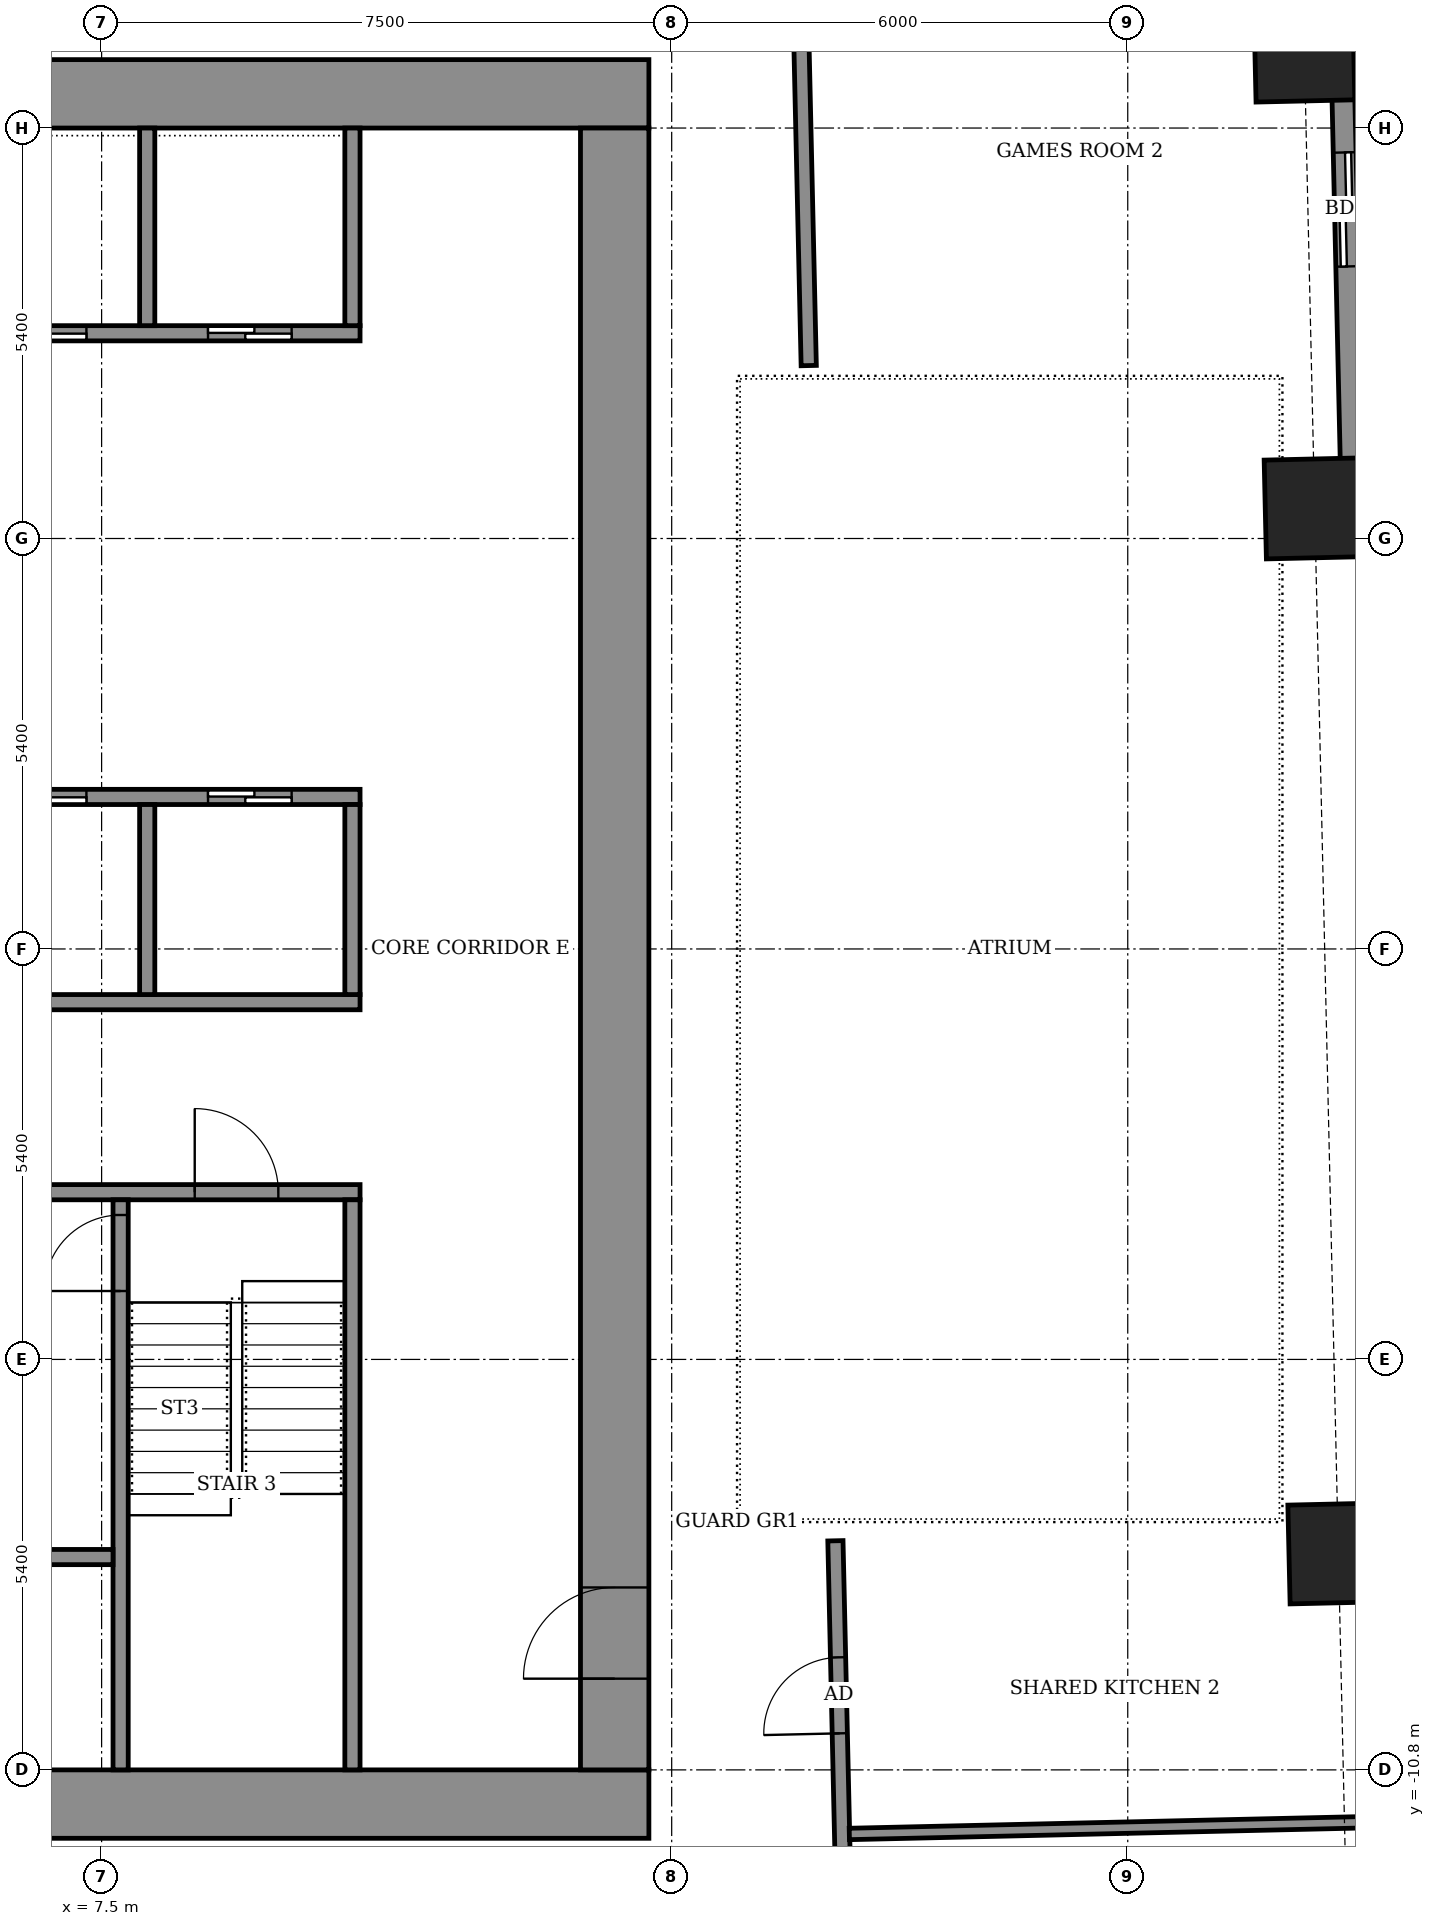
"""IFC4 building model, lengths in metres.
Left out: names, types, materials, properties, quantities, classifications, styles, units other than length and angle.
Written with IfcOpenShell. Run it as: python <this file> out.ifc"""

import sys

from ifc_helpers import new_model, si_unit, direction, frame, frame_2d, origin, origin_2d, place, context, subcontext, project, spatial, rectangle, extrude, element, fill, save


model = new_model("IFC4")
c1 = context("Model", 3, precision=1e-05, world=origin(), true_north=direction((0.0, 1.0)))
c2 = subcontext(c1, "Body", "Model", "MODEL_VIEW")
j1 = project(units=[si_unit("LENGTHUNIT", "METRE"), si_unit("PLANEANGLEUNIT", "RADIAN")], contexts=[c1])
p1 = place(None, origin())
s1 = spatial("IfcSite", under=j1, at=p1, CompositionType="ELEMENT")
p2 = place(p1, origin())
s2 = spatial("IfcBuilding", under=s1, at=p2, CompositionType="ELEMENT")
p3 = place(p2, frame((0.0, 0.0, 140.9)))
s3 = spatial("IfcBuildingStorey", under=s2, at=p3, CompositionType="ELEMENT", Elevation=140.9)
for number, where, z_axis, x_axis in (
    (1, (23.771, -7.952, -0.55), (0.0, 0.0, 1.0), (-0.023, 1.0, 0.0)),
    (2, (23.459, 5.796, -0.55), (0.0, 0.0, 1.0), (-0.023, 1.0, 0.0)),
    (3, (23.323, 11.806, -0.55), (0.0, 0.0, 1.0), (-0.023, 1.0, 0.0)),
):
    element("IfcColumn", number, at=place(p3, frame(where, z_axis=z_axis, x_axis=x_axis)), inside=s3, PredefinedType="COLUMN", context=c2, shape_type="SweptSolid", body=[
        extrude(rectangle(XDim=1.3, YDim=1.3, at=origin_2d()), origin(), (0.0, 0.0, 1.0), 3.6),
    ])
p4 = place(p3, frame((23.961, 5.752, 0.0), z_axis=(0.0, 0.0, 1.0), x_axis=(-0.022715362207, 0.999741972871, 0.0)))
e4 = element("IfcWall", 4, at=p4, inside=s3, PredefinedType="SOLIDWALL", context=c2, shape_type="SweptSolid", body=[
    extrude(rectangle(XDim=11.93, YDim=0.3, at=frame_2d((5.965, 0.0))), origin(), (0.0, 0.0, 1.0), 3.05),
])
p5 = place(p4, frame((3.228, 0.0, 0.0)))
e5 = element("IfcOpeningElement", 5, at=p5, cuts=e4, PredefinedType="OPENING", context=c2, shape_type="SweptSolid", body=[
    extrude(rectangle(XDim=1.5, YDim=2.4, at=frame_2d((0.75, 1.2))), frame((0.0, 0.16, 0.0), z_axis=(0.0, -1.0, 0.0), x_axis=(1.0, 0.0, 0.0)), (0.0, 0.0, 1.0), 0.32),
])
p6 = place(p4, frame((7.629, 0.0, 0.9)))
e6 = element("IfcOpeningElement", 6, at=p6, cuts=e4, PredefinedType="OPENING", context=c2, shape_type="SweptSolid", body=[
    extrude(rectangle(XDim=0.9, YDim=1.5, at=frame_2d((0.45, 0.75))), frame((0.0, 0.16, 0.0), z_axis=(0.0, -1.0, 0.0), x_axis=(1.0, 0.0, 0.0)), (0.0, 0.0, 1.0), 0.32),
])
p7 = place(p4, frame((9.316, 0.0, 0.9)))
e7 = element("IfcOpeningElement", 7, at=p7, cuts=e4, PredefinedType="OPENING", context=c2, shape_type="SweptSolid", body=[
    extrude(rectangle(XDim=1.2, YDim=1.5, at=frame_2d((0.6, 0.75))), frame((0.0, 0.16, 0.0), z_axis=(0.0, -1.0, 0.0), x_axis=(1.0, 0.0, 0.0)), (0.0, 0.0, 1.0), 0.32),
])
p8 = place(p3, frame((17.328, -15.448, 0.0), z_axis=(0.0, 0.0, 1.0), x_axis=(-0.022680883318, 0.999742755679, 0.0)))
e8 = element("IfcWall", 8, at=p8, inside=s3, PredefinedType="PARTITIONING", context=c2, shape_type="SweptSolid", body=[
    extrude(rectangle(XDim=7.664, YDim=0.2, at=frame_2d((3.832, 0.0))), origin(), (0.0, 0.0, 1.0), 3.05),
])
p9 = place(p8, frame((5.13, 0.0, 0.0)))
e9 = element("IfcOpeningElement", 9, at=p9, cuts=e8, PredefinedType="OPENING", context=c2, shape_type="SweptSolid", body=[
    extrude(rectangle(XDim=1.0, YDim=2.1, at=frame_2d((0.5, 1.05))), frame((0.0, 0.11, 0.0), z_axis=(0.0, -1.0, 0.0), x_axis=(1.0, 0.0, 0.0)), (0.0, 0.0, 1.0), 0.22),
])
p10 = place(p3, frame((17.337, -11.643, 0.0), z_axis=(0.0, 0.0, 1.0), x_axis=(0.999741061159, 0.022755452803, 0.0)))
e10 = element("IfcWall", 10, at=p10, inside=s3, PredefinedType="PARTITIONING", context=c2, shape_type="SweptSolid", body=[
    extrude(rectangle(XDim=7.167, YDim=0.15, at=frame_2d((3.583, 0.0))), origin(), (0.0, 0.0, 1.0), 2.55),
])
p11 = place(p3, frame((16.803, 7.675, 0.0), z_axis=(0.0, 0.0, 1.0), x_axis=(-0.022667483124, 0.999743059595, 0.0)))
e11 = element("IfcWall", 11, at=p11, inside=s3, PredefinedType="PARTITIONING", context=c2, shape_type="SweptSolid", body=[
    extrude(rectangle(XDim=5.245, YDim=0.2, at=frame_2d((2.623, 0.0))), origin(), (0.0, 0.0, 1.0), 3.05),
])
for number, where, z_axis, x_axis in (
    (12, (-14.7, -11.25, 0.0), (0.0, 0.0, 1.0), (1.0, 0.0, 0.0)),
    (13, (-14.7, 11.25, 0.0), (0.0, 0.0, 1.0), (1.0, 0.0, 0.0)),
):
    element("IfcWall", number, at=place(p3, frame(where, z_axis=z_axis, x_axis=x_axis)), inside=s3, PredefinedType="SHEAR", context=c2, shape_type="SweptSolid", body=[
        extrude(rectangle(XDim=29.4, YDim=0.9, at=frame_2d((14.7, 0.0))), origin(), (0.0, 0.0, 1.0), 3.6),
    ])
p12 = place(p3, frame((14.25, -10.8, 0.0), z_axis=(0.0, 0.0, 1.0), x_axis=(0.0, 1.0, 0.0)))
e14 = element("IfcWall", 14, at=p12, inside=s3, PredefinedType="SHEAR", context=c2, shape_type="SweptSolid", body=[
    extrude(rectangle(XDim=21.6, YDim=0.9, at=frame_2d((10.8, 0.0))), origin(), (0.0, 0.0, 1.0), 3.6),
])
p13 = place(p12, frame((1.2, 0.0, 0.0)))
e15 = element("IfcOpeningElement", 15, at=p13, cuts=e14, PredefinedType="OPENING", context=c2, shape_type="SweptSolid", body=[
    extrude(rectangle(XDim=1.2, YDim=2.1, at=frame_2d((0.6, 1.05))), frame((0.0, 0.46, 0.0), z_axis=(0.0, -1.0, 0.0), x_axis=(1.0, 0.0, 0.0)), (0.0, 0.0, 1.0), 0.92),
])
p14 = place(p3, frame((-10.9, -3.2, 0.0), z_axis=(0.0, 0.0, 1.0), x_axis=(1.0, 0.0, 0.0)))
e16 = element("IfcWall", 16, at=p14, inside=s3, PredefinedType="SHEAR", context=c2, shape_type="SweptSolid", body=[
    extrude(rectangle(XDim=21.8, YDim=0.2, at=frame_2d((10.9, 0.0))), origin(), (0.0, 0.0, 1.0), 3.05),
])
p15 = place(p14, frame((1.075, 0.0, 0.0)))
e17 = element("IfcOpeningElement", 17, at=p15, cuts=e16, PredefinedType="OPENING", context=c2, shape_type="SweptSolid", body=[
    extrude(rectangle(XDim=1.1, YDim=2.1, at=frame_2d((0.55, 1.05))), frame((0.0, 0.11, 0.0), z_axis=(0.0, -1.0, 0.0), x_axis=(1.0, 0.0, 0.0)), (0.0, 0.0, 1.0), 0.22),
])
p16 = place(p14, frame((10.325, 0.0, 0.0)))
e18 = element("IfcOpeningElement", 18, at=p16, cuts=e16, PredefinedType="OPENING", context=c2, shape_type="SweptSolid", body=[
    extrude(rectangle(XDim=1.1, YDim=2.1, at=frame_2d((0.55, 1.05))), frame((0.0, 0.11, 0.0), z_axis=(0.0, -1.0, 0.0), x_axis=(1.0, 0.0, 0.0)), (0.0, 0.0, 1.0), 0.22),
])
p17 = place(p14, frame((19.625, 0.0, 0.0)))
e19 = element("IfcOpeningElement", 19, at=p17, cuts=e16, PredefinedType="OPENING", context=c2, shape_type="SweptSolid", body=[
    extrude(rectangle(XDim=1.1, YDim=2.1, at=frame_2d((0.55, 1.05))), frame((0.0, 0.11, 0.0), z_axis=(0.0, -1.0, 0.0), x_axis=(1.0, 0.0, 0.0)), (0.0, 0.0, 1.0), 0.22),
])
p18 = place(p14, frame((5.7, 0.0, 0.0)))
e20 = element("IfcOpeningElement", 20, at=p18, cuts=e16, PredefinedType="OPENING", context=c2, shape_type="SweptSolid", body=[
    extrude(rectangle(XDim=1.1, YDim=2.1, at=frame_2d((0.55, 1.05))), frame((0.0, 0.11, 0.0), z_axis=(0.0, -1.0, 0.0), x_axis=(1.0, 0.0, 0.0)), (0.0, 0.0, 1.0), 0.22),
])
p19 = place(p14, frame((14.975, 0.0, 0.0)))
e21 = element("IfcOpeningElement", 21, at=p19, cuts=e16, PredefinedType="OPENING", context=c2, shape_type="SweptSolid", body=[
    extrude(rectangle(XDim=1.1, YDim=2.1, at=frame_2d((0.55, 1.05))), frame((0.0, 0.11, 0.0), z_axis=(0.0, -1.0, 0.0), x_axis=(1.0, 0.0, 0.0)), (0.0, 0.0, 1.0), 0.22),
])
p20 = place(p3, frame((-10.9, -0.7, 0.0), z_axis=(0.0, 0.0, 1.0), x_axis=(1.0, 0.0, 0.0)))
e22 = element("IfcWall", 22, at=p20, inside=s3, PredefinedType="SHEAR", context=c2, shape_type="SweptSolid", body=[
    extrude(rectangle(XDim=21.8, YDim=0.2, at=frame_2d((10.9, 0.0))), origin(), (0.0, 0.0, 1.0), 3.05),
])
p21 = place(p3, frame((-10.9, 2.0, 0.0), z_axis=(0.0, 0.0, 1.0), x_axis=(1.0, 0.0, 0.0)))
e23 = element("IfcWall", 23, at=p21, inside=s3, PredefinedType="SHEAR", context=c2, shape_type="SweptSolid", body=[
    extrude(rectangle(XDim=21.8, YDim=0.2, at=frame_2d((10.9, 0.0))), origin(), (0.0, 0.0, 1.0), 3.05),
])
p22 = place(p21, frame((14.4, 0.0, 0.0)))
e24 = element("IfcOpeningElement", 24, at=p22, cuts=e23, PredefinedType="OPENING", context=c2, shape_type="SweptSolid", body=[
    extrude(rectangle(XDim=1.1, YDim=2.1, at=frame_2d((0.55, 1.05))), frame((0.0, 0.11, 0.0), z_axis=(0.0, -1.0, 0.0), x_axis=(1.0, 0.0, 0.0)), (0.0, 0.0, 1.0), 0.22),
])
p23 = place(p21, frame((17.1, 0.0, 0.0)))
e25 = element("IfcOpeningElement", 25, at=p23, cuts=e23, PredefinedType="OPENING", context=c2, shape_type="SweptSolid", body=[
    extrude(rectangle(XDim=1.1, YDim=2.1, at=frame_2d((0.55, 1.05))), frame((0.0, 0.11, 0.0), z_axis=(0.0, -1.0, 0.0), x_axis=(1.0, 0.0, 0.0)), (0.0, 0.0, 1.0), 0.22),
])
p24 = place(p21, frame((19.8, 0.0, 0.0)))
e26 = element("IfcOpeningElement", 26, at=p24, cuts=e23, PredefinedType="OPENING", context=c2, shape_type="SweptSolid", body=[
    extrude(rectangle(XDim=1.1, YDim=2.1, at=frame_2d((0.55, 1.05))), frame((0.0, 0.11, 0.0), z_axis=(0.0, -1.0, 0.0), x_axis=(1.0, 0.0, 0.0)), (0.0, 0.0, 1.0), 0.22),
])
p25 = place(p21, frame((1.675, 0.0, 0.0)))
e27 = element("IfcOpeningElement", 27, at=p25, cuts=e23, PredefinedType="OPENING", context=c2, shape_type="SweptSolid", body=[
    extrude(rectangle(XDim=0.9, YDim=2.1, at=frame_2d((0.45, 1.05))), frame((0.0, 0.11, 0.0), z_axis=(0.0, -1.0, 0.0), x_axis=(1.0, 0.0, 0.0)), (0.0, 0.0, 1.0), 0.22),
])
p26 = place(p21, frame((8.425, 0.0, 0.0)))
e28 = element("IfcOpeningElement", 28, at=p26, cuts=e23, PredefinedType="OPENING", context=c2, shape_type="SweptSolid", body=[
    extrude(rectangle(XDim=0.9, YDim=2.1, at=frame_2d((0.45, 1.05))), frame((0.0, 0.11, 0.0), z_axis=(0.0, -1.0, 0.0), x_axis=(1.0, 0.0, 0.0)), (0.0, 0.0, 1.0), 0.22),
])
p27 = place(p3, frame((-10.9, 8.1, 0.0), z_axis=(0.0, 0.0, 1.0), x_axis=(1.0, 0.0, 0.0)))
e29 = element("IfcWall", 29, at=p27, inside=s3, PredefinedType="SHEAR", context=c2, shape_type="SweptSolid", body=[
    extrude(rectangle(XDim=21.8, YDim=0.2, at=frame_2d((10.9, 0.0))), origin(), (0.0, 0.0, 1.0), 3.05),
])
p28 = place(p27, frame((14.4, 0.0, 0.0)))
e30 = element("IfcOpeningElement", 30, at=p28, cuts=e29, PredefinedType="OPENING", context=c2, shape_type="SweptSolid", body=[
    extrude(rectangle(XDim=1.1, YDim=2.1, at=frame_2d((0.55, 1.05))), frame((0.0, 0.11, 0.0), z_axis=(0.0, -1.0, 0.0), x_axis=(1.0, 0.0, 0.0)), (0.0, 0.0, 1.0), 0.22),
])
p29 = place(p27, frame((17.1, 0.0, 0.0)))
e31 = element("IfcOpeningElement", 31, at=p29, cuts=e29, PredefinedType="OPENING", context=c2, shape_type="SweptSolid", body=[
    extrude(rectangle(XDim=1.1, YDim=2.1, at=frame_2d((0.55, 1.05))), frame((0.0, 0.11, 0.0), z_axis=(0.0, -1.0, 0.0), x_axis=(1.0, 0.0, 0.0)), (0.0, 0.0, 1.0), 0.22),
])
p30 = place(p27, frame((19.8, 0.0, 0.0)))
e32 = element("IfcOpeningElement", 32, at=p30, cuts=e29, PredefinedType="OPENING", context=c2, shape_type="SweptSolid", body=[
    extrude(rectangle(XDim=1.1, YDim=2.1, at=frame_2d((0.55, 1.05))), frame((0.0, 0.11, 0.0), z_axis=(0.0, -1.0, 0.0), x_axis=(1.0, 0.0, 0.0)), (0.0, 0.0, 1.0), 0.22),
])
p31 = place(p27, frame((1.675, 0.0, 0.0)))
e33 = element("IfcOpeningElement", 33, at=p31, cuts=e29, PredefinedType="OPENING", context=c2, shape_type="SweptSolid", body=[
    extrude(rectangle(XDim=0.9, YDim=2.1, at=frame_2d((0.45, 1.05))), frame((0.0, 0.11, 0.0), z_axis=(0.0, -1.0, 0.0), x_axis=(1.0, 0.0, 0.0)), (0.0, 0.0, 1.0), 0.22),
])
p32 = place(p27, frame((8.425, 0.0, 0.0)))
e34 = element("IfcOpeningElement", 34, at=p32, cuts=e29, PredefinedType="OPENING", context=c2, shape_type="SweptSolid", body=[
    extrude(rectangle(XDim=0.9, YDim=2.1, at=frame_2d((0.45, 1.05))), frame((0.0, 0.11, 0.0), z_axis=(0.0, -1.0, 0.0), x_axis=(1.0, 0.0, 0.0)), (0.0, 0.0, 1.0), 0.22),
])
p33 = place(p3, frame((7.75, -10.8, 0.0), z_axis=(0.0, 0.0, 1.0), x_axis=(0.0, 1.0, 0.0)))
e35 = element("IfcWall", 35, at=p33, inside=s3, PredefinedType="SHEAR", context=c2, shape_type="SweptSolid", body=[
    extrude(rectangle(XDim=7.5, YDim=0.2, at=frame_2d((3.75, 0.0))), origin(), (0.0, 0.0, 1.0), 3.05),
])
p34 = place(p33, frame((6.3, 0.0, 0.0)))
e36 = element("IfcOpeningElement", 36, at=p34, cuts=e35, PredefinedType="OPENING", context=c2, shape_type="SweptSolid", body=[
    extrude(rectangle(XDim=1.0, YDim=2.1, at=frame_2d((0.5, 1.05))), frame((0.0, 0.11, 0.0), z_axis=(0.0, -1.0, 0.0), x_axis=(1.0, 0.0, 0.0)), (0.0, 0.0, 1.0), 0.22),
])
p35 = place(p3, frame((10.8, -10.8, 0.0), z_axis=(0.0, 0.0, 1.0), x_axis=(0.0, 1.0, 0.0)))
e37 = element("IfcWall", 37, at=p35, inside=s3, PredefinedType="SHEAR", context=c2, shape_type="SweptSolid", body=[
    extrude(rectangle(XDim=7.5, YDim=0.2, at=frame_2d((3.75, 0.0))), origin(), (0.0, 0.0, 1.0), 3.05),
])
p36 = place(p3, frame((1.6, -8.0, 0.0), z_axis=(0.0, 0.0, 1.0), x_axis=(1.0, 0.0, 0.0)))
e38 = element("IfcWall", 38, at=p36, inside=s3, PredefinedType="SHEAR", context=c2, shape_type="SweptSolid", body=[
    extrude(rectangle(XDim=6.05, YDim=0.2, at=frame_2d((3.025, 0.0))), origin(), (0.0, 0.0, 1.0), 3.05),
])
p37 = place(p36, frame((0.913, 0.0, 0.0)))
e39 = element("IfcOpeningElement", 39, at=p37, cuts=e38, PredefinedType="OPENING", context=c2, shape_type="SweptSolid", body=[
    extrude(rectangle(XDim=1.1, YDim=2.1, at=frame_2d((0.55, 1.05))), frame((0.0, 0.11, 0.0), z_axis=(0.0, -1.0, 0.0), x_axis=(1.0, 0.0, 0.0)), (0.0, 0.0, 1.0), 0.22),
])
p38 = place(p36, frame((4.038, 0.0, 0.0)))
e40 = element("IfcOpeningElement", 40, at=p38, cuts=e38, PredefinedType="OPENING", context=c2, shape_type="SweptSolid", body=[
    extrude(rectangle(XDim=1.1, YDim=2.1, at=frame_2d((0.55, 1.05))), frame((0.0, 0.11, 0.0), z_axis=(0.0, -1.0, 0.0), x_axis=(1.0, 0.0, 0.0)), (0.0, 0.0, 1.0), 0.22),
])
for number, where, z_axis, x_axis in (
    (41, (8.1, -0.6, 0.0), (0.0, 0.0, 1.0), (0.0, 1.0, 0.0)),
    (42, (10.8, -0.6, 0.0), (0.0, 0.0, 1.0), (0.0, 1.0, 0.0)),
):
    element("IfcWall", number, at=place(p3, frame(where, z_axis=z_axis, x_axis=x_axis)), inside=s3, PredefinedType="SHEAR", context=c2, shape_type="SweptSolid", body=[
        extrude(rectangle(XDim=2.5, YDim=0.2, at=frame_2d((1.25, 0.0))), origin(), (0.0, 0.0, 1.0), 3.05),
    ])
for number, where, z_axis, x_axis in (
    (43, (8.1, 8.2, 0.0), (0.0, 0.0, 1.0), (0.0, 1.0, 0.0)),
    (44, (10.8, 8.2, 0.0), (0.0, 0.0, 1.0), (0.0, 1.0, 0.0)),
):
    element("IfcWall", number, at=place(p3, frame(where, z_axis=z_axis, x_axis=x_axis)), inside=s3, PredefinedType="SHEAR", context=c2, shape_type="SweptSolid", body=[
        extrude(rectangle(XDim=2.6, YDim=0.2, at=frame_2d((1.3, 0.0))), origin(), (0.0, 0.0, 1.0), 3.05),
    ])
p39 = place(p5, origin())
e45 = element("IfcDoor", 45, at=p39, inside=s3, OperationType="SLIDING_TO_LEFT", PredefinedType="DOOR", context=c2, shape_type="SweptSolid", body=[
    extrude(rectangle(XDim=1.5, YDim=2.4, at=frame_2d((0.75, 1.2))), frame((0.0, 0.025, 0.0), z_axis=(0.0, -1.0, 0.0), x_axis=(1.0, 0.0, 0.0)), (0.0, 0.0, 1.0), 0.05),
])
fill(e5, e45)
p40 = place(p9, origin())
e46 = element("IfcDoor", 46, at=p40, inside=s3, OperationType="SINGLE_SWING_RIGHT", PredefinedType="DOOR", context=c2, shape_type="SweptSolid", body=[
    extrude(rectangle(XDim=1.0, YDim=2.1, at=frame_2d((0.5, 1.05))), frame((0.0, 0.025, 0.0), z_axis=(0.0, -1.0, 0.0), x_axis=(1.0, 0.0, 0.0)), (0.0, 0.0, 1.0), 0.05),
])
fill(e9, e46)
p41 = place(p13, origin())
e47 = element("IfcDoor", 47, at=p41, inside=s3, OperationType="DOUBLE_DOOR_SINGLE_SWING", PredefinedType="DOOR", context=c2, shape_type="SweptSolid", body=[
    extrude(rectangle(XDim=1.2, YDim=2.1, at=frame_2d((0.6, 1.05))), frame((0.0, 0.025, 0.0), z_axis=(0.0, -1.0, 0.0), x_axis=(1.0, 0.0, 0.0)), (0.0, 0.0, 1.0), 0.05),
])
fill(e15, e47)
p42 = place(p23, origin())
e48 = element("IfcDoor", 48, at=p42, inside=s3, OperationType="SLIDING_TO_LEFT", PredefinedType="DOOR", context=c2, shape_type="SweptSolid", body=[
    extrude(rectangle(XDim=1.1, YDim=2.1, at=frame_2d((0.55, 1.05))), frame((0.0, 0.025, 0.0), z_axis=(0.0, -1.0, 0.0), x_axis=(1.0, 0.0, 0.0)), (0.0, 0.0, 1.0), 0.05),
])
fill(e25, e48)
p43 = place(p24, origin())
e49 = element("IfcDoor", 49, at=p43, inside=s3, OperationType="SLIDING_TO_LEFT", PredefinedType="DOOR", context=c2, shape_type="SweptSolid", body=[
    extrude(rectangle(XDim=1.1, YDim=2.1, at=frame_2d((0.55, 1.05))), frame((0.0, 0.025, 0.0), z_axis=(0.0, -1.0, 0.0), x_axis=(1.0, 0.0, 0.0)), (0.0, 0.0, 1.0), 0.05),
])
fill(e26, e49)
p44 = place(p29, origin())
e50 = element("IfcDoor", 50, at=p44, inside=s3, OperationType="SLIDING_TO_LEFT", PredefinedType="DOOR", context=c2, shape_type="SweptSolid", body=[
    extrude(rectangle(XDim=1.1, YDim=2.1, at=frame_2d((0.55, 1.05))), frame((0.0, 0.025, 0.0), z_axis=(0.0, -1.0, 0.0), x_axis=(1.0, 0.0, 0.0)), (0.0, 0.0, 1.0), 0.05),
])
fill(e31, e50)
p45 = place(p30, origin())
e51 = element("IfcDoor", 51, at=p45, inside=s3, OperationType="SLIDING_TO_LEFT", PredefinedType="DOOR", context=c2, shape_type="SweptSolid", body=[
    extrude(rectangle(XDim=1.1, YDim=2.1, at=frame_2d((0.55, 1.05))), frame((0.0, 0.025, 0.0), z_axis=(0.0, -1.0, 0.0), x_axis=(1.0, 0.0, 0.0)), (0.0, 0.0, 1.0), 0.05),
])
fill(e32, e51)
p46 = place(p17, origin())
e52 = element("IfcDoor", 52, at=p46, inside=s3, OperationType="SINGLE_SWING_RIGHT", PredefinedType="DOOR", context=c2, shape_type="SweptSolid", body=[
    extrude(rectangle(XDim=1.1, YDim=2.1, at=frame_2d((0.55, 1.05))), frame((0.0, 0.025, 0.0), z_axis=(0.0, -1.0, 0.0), x_axis=(1.0, 0.0, 0.0)), (0.0, 0.0, 1.0), 0.05),
])
fill(e19, e52)
p47 = place(p34, origin())
e53 = element("IfcDoor", 53, at=p47, inside=s3, OperationType="SINGLE_SWING_RIGHT", PredefinedType="DOOR", context=c2, shape_type="SweptSolid", body=[
    extrude(rectangle(XDim=1.0, YDim=2.1, at=frame_2d((0.5, 1.05))), frame((0.0, 0.025, 0.0), z_axis=(0.0, -1.0, 0.0), x_axis=(1.0, 0.0, 0.0)), (0.0, 0.0, 1.0), 0.05),
])
fill(e36, e53)
save(model, sys.argv[1])
